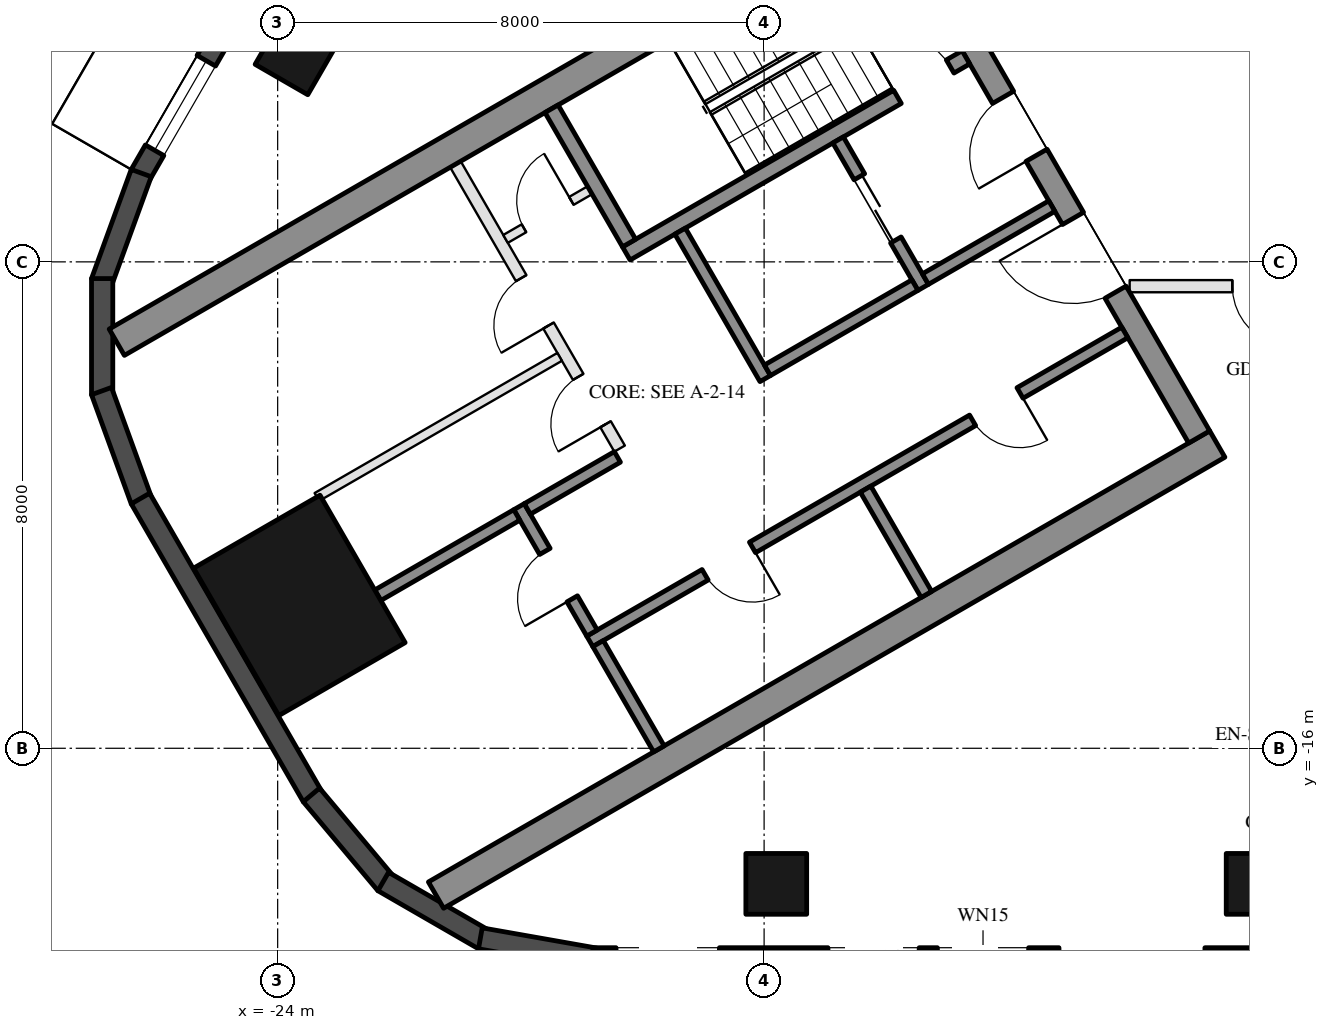
"""IFC4 building model, lengths in metres.
Left out: names, types, materials, properties, quantities, classifications, styles, units other than length and angle.
Written with IfcOpenShell. Run it as: python <this file> out.ifc"""

import sys

from ifc_helpers import new_model, si_unit, direction, frame, frame_2d, origin, origin_2d, place, context, subcontext, project, spatial, rectangle, hollow_rectangle, extrude, element, fill, save


model = new_model("IFC4")
c1 = context("Model", 3, precision=1e-05, world=origin(), true_north=direction((0.0, 1.0)))
c2 = subcontext(c1, "Body", "Model", "MODEL_VIEW")
j1 = project(units=[si_unit("LENGTHUNIT", "METRE"), si_unit("PLANEANGLEUNIT", "RADIAN")], contexts=[c1])
p1 = place(None, origin())
s1 = spatial("IfcSite", under=j1, at=p1, CompositionType="ELEMENT")
p2 = place(p1, origin())
s2 = spatial("IfcBuilding", under=s1, at=p2, CompositionType="ELEMENT")
p3 = place(p2, frame((0.0, 0.0, 72.4)))
s3 = spatial("IfcBuildingStorey", under=s2, at=p3, CompositionType="ELEMENT", Elevation=72.4)
for number, where, z_axis, x_axis in (
    (1, (-15.8, -18.23, 0.0), (0.0, 0.0, 1.0), (-1.0, 0.0, 0.0)),
    (2, (-7.9, -18.23, 0.0), (0.0, 0.0, 1.0), (-1.0, 0.0, 0.0)),
    (3, (-23.688, -4.568, 0.0), (0.0, 0.0, 1.0), (0.5, 0.866, 0.0)),
):
    element("IfcColumn", number, at=place(p3, frame(where, z_axis=z_axis, x_axis=x_axis)), inside=s3, PredefinedType="COLUMN", context=c2, shape_type="SweptSolid", body=[
        extrude(hollow_rectangle(XDim=1.0, YDim=1.0, WallThickness=0.045, at=origin_2d()), origin(), (0.0, 0.0, 1.0), 3.7),
    ])
p4 = place(p3, frame((-23.643, -13.65, 0.0), z_axis=(0.0, 0.0, 1.0), x_axis=(-0.5, 0.866025403784, 0.0)))
e4 = element("IfcColumn", 4, at=p4, inside=s3, PredefinedType="COLUMN", context=c2, shape_type="SweptSolid", body=[
    extrude(hollow_rectangle(XDim=2.8, YDim=2.4, WallThickness=0.07, at=origin_2d()), origin(), (0.0, 0.0, 1.0), 3.7),
])
p5 = place(p3, frame((-24.299, -3.176, 0.0), z_axis=(0.0, 0.0, 1.0), x_axis=(-0.500028278809, -0.866009076391, 0.0)))
e5 = element("IfcWall", 5, at=p5, inside=s3, PredefinedType="SOLIDWALL", context=c2, shape_type="SweptSolid", body=[
    extrude(rectangle(XDim=3.916, YDim=0.35, at=frame_2d((1.958, 0.0))), origin(), (0.0, 0.0, 1.0), 3.55),
])
p6 = place(p5, frame((1.75, 0.0, 0.3)))
e6 = element("IfcOpeningElement", 6, at=p6, cuts=e5, PredefinedType="OPENING", context=c2, shape_type="SweptSolid", body=[
    extrude(rectangle(XDim=1.7, YDim=2.65, at=frame_2d((0.85, 1.325))), frame((0.0, 0.185, 0.0), z_axis=(0.0, -1.0, 0.0), x_axis=(1.0, 0.0, 0.0)), (0.0, 0.0, 1.0), 0.37),
])
for number, where, z_axis, x_axis in (
    (7, (-26.244, -6.54, 0.0), (0.0, 0.0, 1.0), (-0.342, -0.94, 0.0)),
    (8, (-26.886, -8.275, 0.0), (0.0, 0.0, 1.0), (0.0, -1.0, 0.0)),
    (9, (-26.897, -10.125, 0.0), (0.0, 0.0, 1.0), (0.342, -0.94, 0.0)),
):
    element("IfcWall", number, at=place(p3, frame(where, z_axis=z_axis, x_axis=x_axis)), inside=s3, PredefinedType="SOLIDWALL", context=c2, shape_type="SweptSolid", body=[
        extrude(rectangle(XDim=1.91, YDim=0.35, at=frame_2d((0.955, 0.0))), origin(), (0.0, 0.0, 1.0), 3.55),
    ])
p7 = place(p3, frame((-26.257, -11.893, 0.0), z_axis=(0.0, 0.0, 1.0), x_axis=(0.500018773155, -0.866014564827, 0.0)))
e10 = element("IfcWall", 10, at=p7, inside=s3, PredefinedType="SOLIDWALL", context=c2, shape_type="SweptSolid", body=[
    extrude(rectangle(XDim=5.658, YDim=0.35, at=frame_2d((2.829, 0.0))), origin(), (0.0, 0.0, 1.0), 3.55),
])
for number, where, z_axis, x_axis in (
    (11, (-23.445, -16.768, 0.0), (0.0, 0.0, 1.0), (0.643, -0.766, 0.0)),
    (12, (-22.264, -18.192, 0.0), (0.0, 0.0, 1.0), (0.866, -0.5, 0.0)),
):
    element("IfcWall", number, at=place(p3, frame(where, z_axis=z_axis, x_axis=x_axis)), inside=s3, PredefinedType="SOLIDWALL", context=c2, shape_type="SweptSolid", body=[
        extrude(rectangle(XDim=1.91, YDim=0.35, at=frame_2d((0.955, 0.0))), origin(), (0.0, 0.0, 1.0), 3.55),
    ])
p8 = place(p3, frame((-20.667, -19.126, 0.0), z_axis=(0.0, 0.0, 1.0), x_axis=(0.984798995425, -0.173697837091, 0.0)))
e13 = element("IfcWall", 13, at=p8, inside=s3, PredefinedType="SOLIDWALL", context=c2, shape_type="SweptSolid", body=[
    extrude(rectangle(XDim=1.91, YDim=0.35, at=frame_2d((0.955, 0.0))), origin(), (0.0, 0.0, 1.0), 3.55),
])
p9 = place(p3, frame((-18.816, -19.455, 0.0), z_axis=(0.0, 0.0, 1.0), x_axis=(1.0, 0.0, 0.0)))
e14 = element("IfcWall", 14, at=p9, inside=s3, PredefinedType="SOLIDWALL", context=c2, shape_type="SweptSolid", body=[
    extrude(rectangle(XDim=11.816, YDim=0.35, at=frame_2d((5.908, 0.0))), origin(), (0.0, 0.0, 1.0), 3.55),
])
p10 = place(p9, frame((0.381, 0.0, 0.3)))
e15 = element("IfcOpeningElement", 15, at=p10, cuts=e14, PredefinedType="OPENING", context=c2, shape_type="SweptSolid", body=[
    extrude(rectangle(XDim=1.7, YDim=2.65, at=frame_2d((0.85, 1.325))), frame((0.0, 0.185, 0.0), z_axis=(0.0, -1.0, 0.0), x_axis=(1.0, 0.0, 0.0)), (0.0, 0.0, 1.0), 0.37),
])
p11 = place(p9, frame((7.665, 0.0, 0.0)))
e16 = element("IfcOpeningElement", 16, at=p11, cuts=e14, PredefinedType="OPENING", context=c2, shape_type="SweptSolid", body=[
    extrude(rectangle(XDim=2.4, YDim=2.4, at=frame_2d((1.2, 1.2))), frame((0.0, 0.185, 0.0), z_axis=(0.0, -1.0, 0.0), x_axis=(1.0, 0.0, 0.0)), (0.0, 0.0, 1.0), 0.37),
])
p12 = place(p9, frame((3.866, 0.0, 0.3)))
e17 = element("IfcOpeningElement", 17, at=p12, cuts=e14, PredefinedType="OPENING", context=c2, shape_type="SweptSolid", body=[
    extrude(rectangle(XDim=1.5, YDim=2.65, at=frame_2d((0.75, 1.325))), frame((0.0, 0.185, 0.0), z_axis=(0.0, -1.0, 0.0), x_axis=(1.0, 0.0, 0.0)), (0.0, 0.0, 1.0), 0.37),
])
p13 = place(p9, frame((5.666, 0.0, 0.3)))
e18 = element("IfcOpeningElement", 18, at=p13, cuts=e14, PredefinedType="OPENING", context=c2, shape_type="SweptSolid", body=[
    extrude(rectangle(XDim=1.5, YDim=2.65, at=frame_2d((0.75, 1.325))), frame((0.0, 0.185, 0.0), z_axis=(0.0, -1.0, 0.0), x_axis=(1.0, 0.0, 0.0)), (0.0, 0.0, 1.0), 0.37),
])
for number, where, z_axis, x_axis in (
    (19, (-13.797, -1.903, 0.0), (0.0, 0.0, 1.0), (-0.866, -0.5, 0.0)),
    (20, (-8.547, -10.997, 0.0), (0.0, 0.0, 1.0), (-0.866, -0.5, 0.0)),
):
    element("IfcWall", number, at=place(p3, frame(where, z_axis=z_axis, x_axis=x_axis)), inside=s3, PredefinedType="SHEAR", context=c2, shape_type="SweptSolid", body=[
        extrude(rectangle(XDim=14.837, YDim=0.5, at=frame_2d((7.418, 0.0))), origin(), (0.0, 0.0, 1.0), 3.5),
    ])
p14 = place(p3, frame((-13.845, -2.22, 0.0), z_axis=(0.0, 0.0, 1.0), x_axis=(0.500004234368, -0.866022959057, 0.0)))
e21 = element("IfcWall", 21, at=p14, inside=s3, PredefinedType="SHEAR", context=c2, shape_type="SweptSolid", body=[
    extrude(rectangle(XDim=10.0, YDim=0.4, at=frame_2d((5.0, 0.0))), origin(), (0.0, 0.0, 1.0), 3.5),
])
p15 = place(p14, frame((3.55, 0.0, 0.0)))
e22 = element("IfcOpeningElement", 22, at=p15, cuts=e21, PredefinedType="OPENING", context=c2, shape_type="SweptSolid", body=[
    extrude(rectangle(XDim=1.1, YDim=2.1, at=frame_2d((0.55, 1.05))), frame((0.0, 0.21, 0.0), z_axis=(0.0, -1.0, 0.0), x_axis=(1.0, 0.0, 0.0)), (0.0, 0.0, 1.0), 0.42),
])
p16 = place(p14, frame((5.85, 0.0, 0.0)))
e23 = element("IfcOpeningElement", 23, at=p16, cuts=e21, PredefinedType="OPENING", context=c2, shape_type="SweptSolid", body=[
    extrude(rectangle(XDim=1.4, YDim=2.1, at=frame_2d((0.7, 1.05))), frame((0.0, 0.21, 0.0), z_axis=(0.0, -1.0, 0.0), x_axis=(1.0, 0.0, 0.0)), (0.0, 0.0, 1.0), 0.42),
])
p17 = place(p3, frame((-12.681, -4.636, 0.0), z_axis=(0.0, 0.0, 1.0), x_axis=(-0.866021702275, -0.500006411147, 0.0)))
e24 = element("IfcWall", 24, at=p17, inside=s3, PredefinedType="SHEAR", context=c2, shape_type="SweptSolid", body=[
    extrude(rectangle(XDim=6.45, YDim=0.25, at=frame_2d((3.225, 0.0))), origin(), (0.0, 0.0, 1.0), 3.5),
])
p18 = place(p17, frame((0.3, 0.0, 0.0)))
e25 = element("IfcOpeningElement", 25, at=p18, cuts=e24, PredefinedType="OPENING", context=c2, shape_type="SweptSolid", body=[
    extrude(rectangle(XDim=1.0, YDim=2.1, at=frame_2d((0.5, 1.05))), frame((0.0, 0.135, 0.0), z_axis=(0.0, -1.0, 0.0), x_axis=(1.0, 0.0, 0.0)), (0.0, 0.0, 1.0), 0.27),
])
p19 = place(p3, frame((-19.496, -5.482, 0.0), z_axis=(0.0, 0.0, 1.0), x_axis=(0.499990435942, -0.866030925526, 0.0)))
e26 = element("IfcWall", 26, at=p19, inside=s3, PredefinedType="SHEAR", context=c2, shape_type="SweptSolid", body=[
    extrude(rectangle(XDim=2.55, YDim=0.25, at=frame_2d((1.275, 0.0))), origin(), (0.0, 0.0, 1.0), 3.5),
])
p20 = place(p3, frame((-17.381, -7.495, 0.0), z_axis=(0.0, 0.0, 1.0), x_axis=(0.500011755427, -0.866018616679, 0.0)))
e27 = element("IfcWall", 27, at=p20, inside=s3, PredefinedType="SHEAR", context=c2, shape_type="SweptSolid", body=[
    extrude(rectangle(XDim=2.8, YDim=0.2, at=frame_2d((1.4, 0.0))), origin(), (0.0, 0.0, 1.0), 3.5),
])
p21 = place(p3, frame((-14.783, -5.995, 0.0), z_axis=(0.0, 0.0, 1.0), x_axis=(0.49994636267, -0.866056369097, 0.0)))
e28 = element("IfcWall", 28, at=p21, inside=s3, PredefinedType="SHEAR", context=c2, shape_type="SweptSolid", body=[
    extrude(rectangle(XDim=2.8, YDim=0.2, at=frame_2d((1.4, 0.0))), origin(), (0.0, 0.0, 1.0), 3.5),
])
p22 = place(p21, frame((0.7, 0.0, 0.0)))
e29 = element("IfcOpeningElement", 29, at=p22, cuts=e28, PredefinedType="OPENING", context=c2, shape_type="SweptSolid", body=[
    extrude(rectangle(XDim=1.2, YDim=2.1, at=frame_2d((0.6, 1.05))), frame((0.0, 0.11, 0.0), z_axis=(0.0, -1.0, 0.0), x_axis=(1.0, 0.0, 0.0)), (0.0, 0.0, 1.0), 0.22),
])
p23 = place(p3, frame((-13.52, -8.383, 0.0), z_axis=(0.0, 0.0, 1.0), x_axis=(-0.866034573852, -0.49998411664, 0.0)))
e30 = element("IfcWall", 30, at=p23, inside=s3, PredefinedType="SHEAR", context=c2, shape_type="SweptSolid", body=[
    extrude(rectangle(XDim=2.8, YDim=0.2, at=frame_2d((1.4, 0.0))), origin(), (0.0, 0.0, 1.0), 3.5),
])
p24 = place(p3, frame((-11.268, -7.083, 0.0), z_axis=(0.0, 0.0, 1.0), x_axis=(-0.866050077142, -0.499957262057, 0.0)))
e31 = element("IfcWall", 31, at=p24, inside=s3, PredefinedType="SHEAR", context=c2, shape_type="SweptSolid", body=[
    extrude(rectangle(XDim=2.4, YDim=0.2, at=frame_2d((1.2, 0.0))), origin(), (0.0, 0.0, 1.0), 3.5),
])
p25 = place(p3, frame((-10.068, -9.162, 0.0), z_axis=(0.0, 0.0, 1.0), x_axis=(-0.866032725843, -0.499987317609, 0.0)))
e32 = element("IfcWall", 32, at=p25, inside=s3, PredefinedType="SHEAR", context=c2, shape_type="SweptSolid", body=[
    extrude(rectangle(XDim=10.16, YDim=0.2, at=frame_2d((5.08, 0.0))), origin(), (0.0, 0.0, 1.0), 3.5),
])
p26 = place(p25, frame((1.99, 0.0, 0.0)))
e33 = element("IfcOpeningElement", 33, at=p26, cuts=e32, PredefinedType="OPENING", context=c2, shape_type="SweptSolid", body=[
    extrude(rectangle(XDim=0.9, YDim=2.1, at=frame_2d((0.45, 1.05))), frame((0.0, 0.11, 0.0), z_axis=(0.0, -1.0, 0.0), x_axis=(1.0, 0.0, 0.0)), (0.0, 0.0, 1.0), 0.22),
])
p27 = place(p25, frame((7.07, 0.0, 0.0)))
e34 = element("IfcOpeningElement", 34, at=p27, cuts=e32, PredefinedType="OPENING", context=c2, shape_type="SweptSolid", body=[
    extrude(rectangle(XDim=0.9, YDim=2.1, at=frame_2d((0.45, 1.05))), frame((0.0, 0.11, 0.0), z_axis=(0.0, -1.0, 0.0), x_axis=(1.0, 0.0, 0.0)), (0.0, 0.0, 1.0), 0.22),
])
p28 = place(p3, frame((-20.031, -12.026, 0.0), z_axis=(0.0, 0.0, 1.0), x_axis=(0.500033551112, -0.866006032174, 0.0)))
e35 = element("IfcWall", 35, at=p28, inside=s3, PredefinedType="SHEAR", context=c2, shape_type="SweptSolid", body=[
    extrude(rectangle(XDim=2.4, YDim=0.2, at=frame_2d((1.2, 0.0))), origin(), (0.0, 0.0, 1.0), 3.5),
])
p29 = place(p28, frame((0.85, 0.0, 0.0)))
e36 = element("IfcOpeningElement", 36, at=p29, cuts=e35, PredefinedType="OPENING", context=c2, shape_type="SweptSolid", body=[
    extrude(rectangle(XDim=0.9, YDim=2.1, at=frame_2d((0.45, 1.05))), frame((0.0, 0.11, 0.0), z_axis=(0.0, -1.0, 0.0), x_axis=(1.0, 0.0, 0.0)), (0.0, 0.0, 1.0), 0.22),
])
p30 = place(p3, frame((-18.413, -11.208, 0.0), z_axis=(0.0, 0.0, 1.0), x_axis=(-0.866038183914, -0.499977863513, 0.0)))
e37 = element("IfcWall", 37, at=p30, inside=s3, PredefinedType="SHEAR", context=c2, shape_type="SweptSolid", body=[
    extrude(rectangle(XDim=1.71, YDim=0.2, at=frame_2d((0.855, 0.0))), origin(), (0.0, 0.0, 1.0), 3.5),
])
for number, where, z_axis, x_axis in (
    (38, (-14.331, -11.738, 0.0), (0.0, 0.0, 1.0), (0.5, -0.866, 0.0)),
    (39, (-18.73, -14.278, 0.0), (0.0, 0.0, 1.0), (0.5, -0.866, 0.0)),
):
    element("IfcWall", number, at=place(p3, frame(where, z_axis=z_axis, x_axis=x_axis)), inside=s3, PredefinedType="SHEAR", context=c2, shape_type="SweptSolid", body=[
        extrude(rectangle(XDim=2.0, YDim=0.2, at=frame_2d((1.0, 0.0))), origin(), (0.0, 0.0, 1.0), 3.5),
    ])
p31 = place(p3, frame((-20.067, -12.163, 0.0), z_axis=(0.0, 0.0, 1.0), x_axis=(-0.866060851709, -0.499938597367, 0.0)))
e40 = element("IfcWall", 40, at=p31, inside=s3, PredefinedType="SHEAR", context=c2, shape_type="SweptSolid", body=[
    extrude(rectangle(XDim=2.64, YDim=0.2, at=frame_2d((1.32, 0.0))), origin(), (0.0, 0.0, 1.0), 3.5),
])
p32 = place(p3, frame((-21.076, -6.395, 0.0), z_axis=(0.0, 0.0, 1.0), x_axis=(0.50001468107, -0.866016927499, 0.0)))
e41 = element("IfcWall", 41, at=p32, inside=s3, PredefinedType="PARTITIONING", context=c2, shape_type="SweptSolid", body=[
    extrude(rectangle(XDim=5.4, YDim=0.2, at=frame_2d((2.7, 0.0))), origin(), (0.0, 0.0, 1.0), 3.5),
])
p33 = place(p32, frame((2.163, 0.0, 0.0)))
e42 = element("IfcOpeningElement", 42, at=p33, cuts=e41, PredefinedType="OPENING", context=c2, shape_type="SweptSolid", body=[
    extrude(rectangle(XDim=0.9, YDim=2.1, at=frame_2d((0.45, 1.05))), frame((0.0, 0.11, 0.0), z_axis=(0.0, -1.0, 0.0), x_axis=(1.0, 0.0, 0.0)), (0.0, 0.0, 1.0), 0.22),
])
p34 = place(p32, frame((4.038, 0.0, 0.0)))
e43 = element("IfcOpeningElement", 43, at=p34, cuts=e41, PredefinedType="OPENING", context=c2, shape_type="SweptSolid", body=[
    extrude(rectangle(XDim=0.9, YDim=2.1, at=frame_2d((0.45, 1.05))), frame((0.0, 0.11, 0.0), z_axis=(0.0, -1.0, 0.0), x_axis=(1.0, 0.0, 0.0)), (0.0, 0.0, 1.0), 0.22),
])
p35 = place(p3, frame((-18.866, -6.822, 0.0), z_axis=(0.0, 0.0, 1.0), x_axis=(-0.866028054938, -0.499995408039, 0.0)))
e44 = element("IfcWall", 44, at=p35, inside=s3, PredefinedType="PARTITIONING", context=c2, shape_type="SweptSolid", body=[
    extrude(rectangle(XDim=1.6, YDim=0.15, at=frame_2d((0.8, 0.0))), origin(), (0.0, 0.0, 1.0), 3.5),
])
p36 = place(p35, frame((0.35, 0.0, 0.0)))
e45 = element("IfcOpeningElement", 45, at=p36, cuts=e44, PredefinedType="OPENING", context=c2, shape_type="SweptSolid", body=[
    extrude(rectangle(XDim=0.9, YDim=2.1, at=frame_2d((0.45, 1.05))), frame((0.0, 0.085, 0.0), z_axis=(0.0, -1.0, 0.0), x_axis=(1.0, 0.0, 0.0)), (0.0, 0.0, 1.0), 0.17),
])
p37 = place(p3, frame((-19.363, -9.562, 0.0), z_axis=(0.0, 0.0, 1.0), x_axis=(-0.86601185002, -0.500023475074, 0.0)))
e46 = element("IfcWall", 46, at=p37, inside=s3, PredefinedType="PARTITIONING", context=c2, shape_type="SweptSolid", body=[
    extrude(rectangle(XDim=4.61, YDim=0.15, at=frame_2d((2.305, 0.0))), origin(), (0.0, 0.0, 1.0), 3.5),
])
p38 = place(p3, frame((-5.611, -8.4, 0.0), z_axis=(0.0, 0.0, 1.0), x_axis=(-1.0, 0.0, 0.0)))
e47 = element("IfcWall", 47, at=p38, inside=s3, PredefinedType="PARTITIONING", context=c2, shape_type="SweptSolid", body=[
    extrude(rectangle(XDim=4.378, YDim=0.2, at=frame_2d((2.189, 0.0))), origin(), (0.0, 0.0, 1.0), 2.95),
])
p39 = place(p38, frame((1.689, 0.0, 0.0)))
e48 = element("IfcOpeningElement", 48, at=p39, cuts=e47, PredefinedType="OPENING", context=c2, shape_type="SweptSolid", body=[
    extrude(rectangle(XDim=1.0, YDim=2.1, at=frame_2d((0.5, 1.05))), frame((0.0, 0.11, 0.0), z_axis=(0.0, -1.0, 0.0), x_axis=(1.0, 0.0, 0.0)), (0.0, 0.0, 1.0), 0.22),
])
p40 = place(p6, origin())
e49 = element("IfcWindow", 49, at=p40, inside=s3, PartitioningType="SINGLE_PANEL", PredefinedType="WINDOW", context=c2, shape_type="SweptSolid", body=[
    extrude(rectangle(XDim=1.7, YDim=2.65, at=frame_2d((0.85, 1.325))), frame((0.0, 0.03, 0.0), z_axis=(0.0, -1.0, 0.0), x_axis=(1.0, 0.0, 0.0)), (0.0, 0.0, 1.0), 0.06),
])
fill(e6, e49)
p41 = place(p22, origin())
e50 = element("IfcDoor", 50, at=p41, inside=s3, OperationType="DOUBLE_DOOR_SLIDING", PredefinedType="DOOR", context=c2, shape_type="SweptSolid", body=[
    extrude(rectangle(XDim=1.2, YDim=2.1, at=frame_2d((0.6, 1.05))), frame((0.0, 0.025, 0.0), z_axis=(0.0, -1.0, 0.0), x_axis=(1.0, 0.0, 0.0)), (0.0, 0.0, 1.0), 0.05),
])
fill(e29, e50)
p42 = place(p36, frame((0.9, 0.0, 0.0), z_axis=(0.0, 0.0, 1.0), x_axis=(-1.0, 0.0, 0.0)))
e51 = element("IfcDoor", 51, at=p42, inside=s3, OperationType="SINGLE_SWING_RIGHT", PredefinedType="DOOR", context=c2, shape_type="SweptSolid", body=[
    extrude(rectangle(XDim=0.9, YDim=2.1, at=frame_2d((0.45, 1.05))), frame((0.0, 0.025, 0.0), z_axis=(0.0, -1.0, 0.0), x_axis=(1.0, 0.0, 0.0)), (0.0, 0.0, 1.0), 0.05),
])
fill(e45, e51)
p43 = place(p26, origin())
e52 = element("IfcDoor", 52, at=p43, inside=s3, OperationType="SINGLE_SWING_LEFT", PredefinedType="DOOR", context=c2, shape_type="SweptSolid", body=[
    extrude(rectangle(XDim=0.9, YDim=2.1, at=frame_2d((0.45, 1.05))), frame((0.0, 0.025, 0.0), z_axis=(0.0, -1.0, 0.0), x_axis=(1.0, 0.0, 0.0)), (0.0, 0.0, 1.0), 0.05),
])
fill(e33, e52)
p44 = place(p27, origin())
e53 = element("IfcDoor", 53, at=p44, inside=s3, OperationType="SINGLE_SWING_LEFT", PredefinedType="DOOR", context=c2, shape_type="SweptSolid", body=[
    extrude(rectangle(XDim=0.9, YDim=2.1, at=frame_2d((0.45, 1.05))), frame((0.0, 0.025, 0.0), z_axis=(0.0, -1.0, 0.0), x_axis=(1.0, 0.0, 0.0)), (0.0, 0.0, 1.0), 0.05),
])
fill(e34, e53)
p45 = place(p29, frame((0.9, 0.0, 0.0), z_axis=(0.0, 0.0, 1.0), x_axis=(-1.0, 0.0, 0.0)))
e54 = element("IfcDoor", 54, at=p45, inside=s3, OperationType="SINGLE_SWING_LEFT", PredefinedType="DOOR", context=c2, shape_type="SweptSolid", body=[
    extrude(rectangle(XDim=0.9, YDim=2.1, at=frame_2d((0.45, 1.05))), frame((0.0, 0.025, 0.0), z_axis=(0.0, -1.0, 0.0), x_axis=(1.0, 0.0, 0.0)), (0.0, 0.0, 1.0), 0.05),
])
fill(e36, e54)
p46 = place(p33, frame((0.9, 0.0, 0.0), z_axis=(0.0, 0.0, 1.0), x_axis=(-1.0, 0.0, 0.0)))
e55 = element("IfcDoor", 55, at=p46, inside=s3, OperationType="SINGLE_SWING_LEFT", PredefinedType="DOOR", context=c2, shape_type="SweptSolid", body=[
    extrude(rectangle(XDim=0.9, YDim=2.1, at=frame_2d((0.45, 1.05))), frame((0.0, 0.025, 0.0), z_axis=(0.0, -1.0, 0.0), x_axis=(1.0, 0.0, 0.0)), (0.0, 0.0, 1.0), 0.05),
])
fill(e42, e55)
p47 = place(p34, frame((0.9, 0.0, 0.0), z_axis=(0.0, 0.0, 1.0), x_axis=(-1.0, 0.0, 0.0)))
e56 = element("IfcDoor", 56, at=p47, inside=s3, OperationType="SINGLE_SWING_LEFT", PredefinedType="DOOR", context=c2, shape_type="SweptSolid", body=[
    extrude(rectangle(XDim=0.9, YDim=2.1, at=frame_2d((0.45, 1.05))), frame((0.0, 0.025, 0.0), z_axis=(0.0, -1.0, 0.0), x_axis=(1.0, 0.0, 0.0)), (0.0, 0.0, 1.0), 0.05),
])
fill(e43, e56)
p48 = place(p15, frame((1.1, 0.0, 0.0), z_axis=(0.0, 0.0, 1.0), x_axis=(-1.0, 0.0, 0.0)))
e57 = element("IfcDoor", 57, at=p48, inside=s3, OperationType="SINGLE_SWING_LEFT", PredefinedType="DOOR", context=c2, shape_type="SweptSolid", body=[
    extrude(rectangle(XDim=1.1, YDim=2.1, at=frame_2d((0.55, 1.05))), frame((0.0, 0.025, 0.0), z_axis=(0.0, -1.0, 0.0), x_axis=(1.0, 0.0, 0.0)), (0.0, 0.0, 1.0), 0.05),
])
fill(e22, e57)
p49 = place(p16, frame((1.4, 0.0, 0.0), z_axis=(0.0, 0.0, 1.0), x_axis=(-1.0, 0.0, 0.0)))
e58 = element("IfcDoor", 58, at=p49, inside=s3, OperationType="DOUBLE_DOOR_SINGLE_SWING", PredefinedType="DOOR", context=c2, shape_type="SweptSolid", body=[
    extrude(rectangle(XDim=1.4, YDim=2.1, at=frame_2d((0.7, 1.05))), frame((0.0, 0.025, 0.0), z_axis=(0.0, -1.0, 0.0), x_axis=(1.0, 0.0, 0.0)), (0.0, 0.0, 1.0), 0.05),
])
fill(e23, e58)
p50 = place(p18, frame((1.0, 0.0, 0.0), z_axis=(0.0, 0.0, 1.0), x_axis=(-1.0, 0.0, 0.0)))
e59 = element("IfcDoor", 59, at=p50, inside=s3, OperationType="SINGLE_SWING_LEFT", PredefinedType="DOOR", context=c2, shape_type="SweptSolid", body=[
    extrude(rectangle(XDim=1.0, YDim=2.1, at=frame_2d((0.5, 1.05))), frame((0.0, 0.025, 0.0), z_axis=(0.0, -1.0, 0.0), x_axis=(1.0, 0.0, 0.0)), (0.0, 0.0, 1.0), 0.05),
])
fill(e25, e59)
p51 = place(p39, origin())
e60 = element("IfcDoor", 60, at=p51, inside=s3, OperationType="SINGLE_SWING_LEFT", PredefinedType="DOOR", context=c2, shape_type="SweptSolid", body=[
    extrude(rectangle(XDim=1.0, YDim=2.1, at=frame_2d((0.5, 1.05))), frame((0.0, 0.025, 0.0), z_axis=(0.0, -1.0, 0.0), x_axis=(1.0, 0.0, 0.0)), (0.0, 0.0, 1.0), 0.05),
])
fill(e48, e60)
save(model, sys.argv[1])
